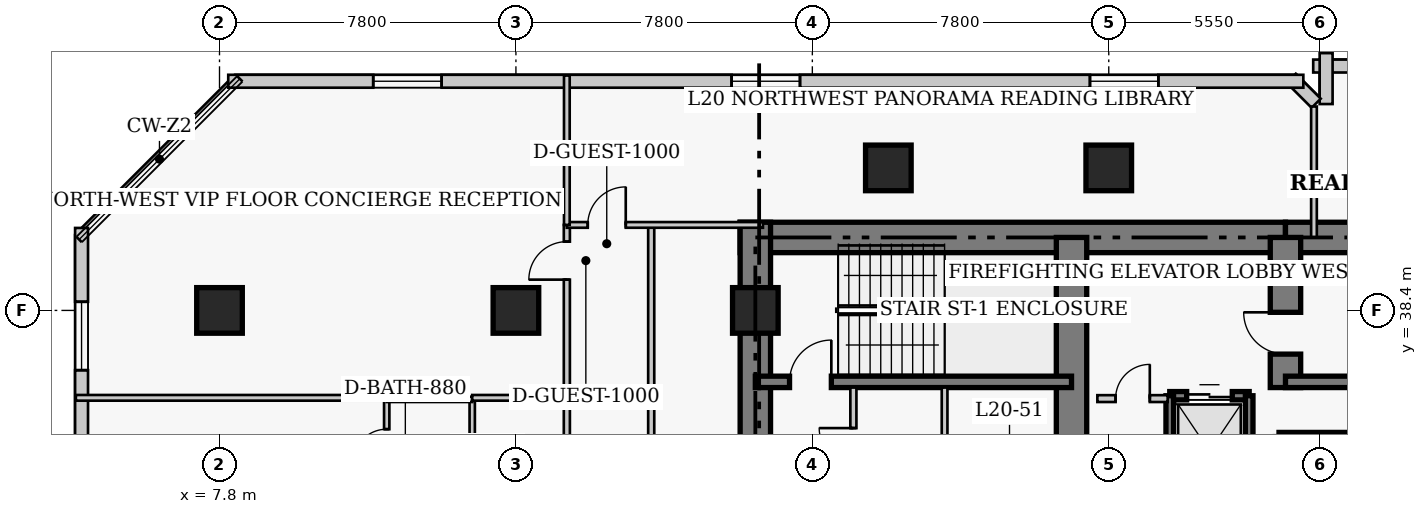
"""IFC4 building model, lengths in metres.
Left out: names, types, materials, properties, quantities, classifications, styles, units other than length and angle.
Written with IfcOpenShell. Run it as: python <this file> out.ifc"""

import sys

from ifc_helpers import new_model, si_unit, direction, frame, frame_2d, origin, origin_2d, place, context, subcontext, project, spatial, rectangle, extrude, element, fill, save


model = new_model("IFC4")
c1 = context("Model", 3, precision=1e-05, world=origin(), true_north=direction((0.0, 1.0)))
c2 = subcontext(c1, "Body", "Model", "MODEL_VIEW")
j1 = project(units=[si_unit("LENGTHUNIT", "METRE"), si_unit("PLANEANGLEUNIT", "RADIAN")], contexts=[c1])
p1 = place(None, origin())
s1 = spatial("IfcSite", under=j1, at=p1, CompositionType="ELEMENT")
p2 = place(p1, origin())
s2 = spatial("IfcBuilding", under=s1, at=p2, CompositionType="ELEMENT")
p3 = place(p2, frame((0.0, 0.0, 84.2)))
s3 = spatial("IfcBuildingStorey", under=s2, at=p3, CompositionType="ELEMENT", Elevation=84.2)
p4 = place(p3, frame((21.5, 40.32, 0.0), z_axis=(0.0, 0.0, 1.0), x_axis=(1.0, 0.0, 0.0)))
e1 = element("IfcWall", 1, at=p4, inside=s3, PredefinedType="SHEAR", context=c2, shape_type="SweptSolid", body=[
    extrude(rectangle(XDim=14.35, YDim=0.8, at=frame_2d((7.175, 0.0))), origin(), (0.0, 0.0, 1.0), 3.8),
])
p5 = place(p3, frame((35.85, 40.32, 0.0), z_axis=(0.0, 0.0, 1.0), x_axis=(1.0, 0.0, 0.0)))
e2 = element("IfcWall", 2, at=p5, inside=s3, PredefinedType="SHEAR", context=c2, shape_type="SweptSolid", body=[
    extrude(rectangle(XDim=12.6, YDim=0.8, at=frame_2d((6.3, 0.0))), origin(), (0.0, 0.0, 1.0), 3.8),
])
p6 = place(p3, frame((21.9, 27.05, 0.0), z_axis=(0.0, 0.0, 1.0), x_axis=(0.0, 1.0, 0.0)))
e3 = element("IfcWall", 3, at=p6, inside=s3, PredefinedType="SHEAR", context=c2, shape_type="SweptSolid", body=[
    extrude(rectangle(XDim=13.67, YDim=0.8, at=frame_2d((6.835, 0.0))), origin(), (0.0, 0.0, 1.0), 3.8),
])
p7 = place(p3, frame((30.22, 33.15, 0.0), z_axis=(0.0, 0.0, 1.0), x_axis=(0.0, 1.0, 0.0)))
e4 = element("IfcWall", 4, at=p7, inside=s3, PredefinedType="SHEAR", context=c2, shape_type="SweptSolid", body=[
    extrude(rectangle(XDim=7.17, YDim=0.8, at=frame_2d((3.585, 0.0))), origin(), (0.0, 0.0, 1.0), 3.8),
])
p8 = place(p3, frame((35.85, 36.37, 0.0), z_axis=(0.0, 0.0, 1.0), x_axis=(0.0, 1.0, 0.0)))
e5 = element("IfcWall", 5, at=p8, inside=s3, PredefinedType="SHEAR", context=c2, shape_type="SweptSolid", body=[
    extrude(rectangle(XDim=3.95, YDim=0.8, at=frame_2d((1.975, 0.0))), origin(), (0.0, 0.0, 1.0), 3.8),
])
p9 = place(p8, frame((0.88, 0.0, 0.0)))
e6 = element("IfcOpeningElement", 6, at=p9, cuts=e5, PredefinedType="OPENING", context=c2, shape_type="SweptSolid", body=[
    extrude(rectangle(XDim=1.1, YDim=2.15, at=frame_2d((0.55, 1.075))), frame((0.0, 0.41, 0.0), z_axis=(0.0, -1.0, 0.0), x_axis=(1.0, 0.0, 0.0)), (0.0, 0.0, 1.0), 0.82),
])
p10 = place(p3, frame((21.9, 36.52, 0.0), z_axis=(0.0, 0.0, 1.0), x_axis=(1.0, 0.0, 0.0)))
e7 = element("IfcWall", 7, at=p10, inside=s3, PredefinedType="SHEAR", context=c2, shape_type="SweptSolid", body=[
    extrude(rectangle(XDim=8.32, YDim=0.3, at=frame_2d((4.16, 0.0))), origin(), (0.0, 0.0, 1.0), 3.8),
])
p11 = place(p10, frame((0.9, 0.0, 0.0)))
e8 = element("IfcOpeningElement", 8, at=p11, cuts=e7, PredefinedType="OPENING", context=c2, shape_type="SweptSolid", body=[
    extrude(rectangle(XDim=1.1, YDim=2.15, at=frame_2d((0.55, 1.075))), frame((0.0, 0.16, 0.0), z_axis=(0.0, -1.0, 0.0), x_axis=(1.0, 0.0, 0.0)), (0.0, 0.0, 1.0), 0.32),
])
p12 = place(p3, frame((35.85, 36.52, 0.0), z_axis=(0.0, 0.0, 1.0), x_axis=(1.0, 0.0, 0.0)))
e9 = element("IfcWall", 9, at=p12, inside=s3, PredefinedType="SHEAR", context=c2, shape_type="SweptSolid", body=[
    extrude(rectangle(XDim=8.33, YDim=0.3, at=frame_2d((4.165, 0.0))), origin(), (0.0, 0.0, 1.0), 3.8),
])
for number, where, z_axis, x_axis in (
    (10, (7.8, 38.4, 0.0), (0.0, 0.0, 1.0), (1.0, 0.0, 0.0)),
    (11, (15.6, 38.4, 0.0), (0.0, 0.0, 1.0), (1.0, 0.0, 0.0)),
    (12, (21.9, 38.4, 0.0), (0.0, 0.0, 1.0), (1.0, 0.0, 0.0)),
    (13, (25.4, 42.15, 0.0), (0.0, 0.0, 1.0), (1.0, 0.0, 0.0)),
    (14, (31.2, 42.15, 0.0), (0.0, 0.0, 1.0), (1.0, 0.0, 0.0)),
):
    element("IfcColumn", number, at=place(p3, frame(where, z_axis=z_axis, x_axis=x_axis)), inside=s3, PredefinedType="COLUMN", context=c2, shape_type="SweptSolid", body=[
        extrude(rectangle(XDim=1.2, YDim=1.2, at=origin_2d()), origin(), (0.0, 0.0, 1.0), 3.8),
    ])
p13 = place(p3, frame((41.42, 44.83, 0.0), z_axis=(0.0, 0.0, 1.0), x_axis=(-1.0, 0.0, 0.0)))
e15 = element("IfcWall", 15, at=p13, inside=s3, PredefinedType="SOLIDWALL", context=c2, shape_type="SweptSolid", body=[
    extrude(rectangle(XDim=4.84, YDim=0.34, at=frame_2d((2.42, 0.0))), origin(), (0.0, 0.0, 1.0), 3.54),
])
p14 = place(p13, frame((1.52, 0.0, 0.85)))
e16 = element("IfcOpeningElement", 16, at=p14, cuts=e15, PredefinedType="OPENING", context=c2, shape_type="SweptSolid", body=[
    extrude(rectangle(XDim=1.8, YDim=1.8, at=frame_2d((0.9, 0.9))), frame((0.0, 0.18, 0.0), z_axis=(0.0, -1.0, 0.0), x_axis=(1.0, 0.0, 0.0)), (0.0, 0.0, 1.0), 0.36),
])
p15 = place(p3, frame((36.92, 45.17, 0.0), z_axis=(0.0, 0.0, 1.0), x_axis=(0.0, -1.0, 0.0)))
e17 = element("IfcWall", 17, at=p15, inside=s3, PredefinedType="SOLIDWALL", context=c2, shape_type="SweptSolid", body=[
    extrude(rectangle(XDim=1.34, YDim=0.34, at=frame_2d((0.67, 0.0))), origin(), (0.0, 0.0, 1.0), 3.54),
])
p16 = place(p3, frame((36.658, 43.852, 0.0), z_axis=(0.0, 0.0, 1.0), x_axis=(-0.707238225886, 0.706975312048, 0.0)))
e18 = element("IfcWall", 18, at=p16, inside=s3, PredefinedType="SOLIDWALL", context=c2, shape_type="SweptSolid", body=[
    extrude(rectangle(XDim=0.929, YDim=0.34, at=frame_2d((0.464, 0.0))), origin(), (0.0, 0.0, 1.0), 3.54),
])
p17 = place(p3, frame((36.32, 44.43, 0.0), z_axis=(0.0, 0.0, 1.0), x_axis=(-1.0, 0.0, 0.0)))
e19 = element("IfcWall", 19, at=p17, inside=s3, PredefinedType="SOLIDWALL", context=c2, shape_type="SweptSolid", body=[
    extrude(rectangle(XDim=28.29, YDim=0.34, at=frame_2d((14.145, 0.0))), origin(), (0.0, 0.0, 1.0), 3.54),
])
p18 = place(p17, frame((3.815, 0.0, 0.85)))
e20 = element("IfcOpeningElement", 20, at=p18, cuts=e19, PredefinedType="OPENING", context=c2, shape_type="SweptSolid", body=[
    extrude(rectangle(XDim=1.8, YDim=1.8, at=frame_2d((0.9, 0.9))), frame((0.0, 0.18, 0.0), z_axis=(0.0, -1.0, 0.0), x_axis=(1.0, 0.0, 0.0)), (0.0, 0.0, 1.0), 0.36),
])
p19 = place(p17, frame((13.245, 0.0, 0.85)))
e21 = element("IfcOpeningElement", 21, at=p19, cuts=e19, PredefinedType="OPENING", context=c2, shape_type="SweptSolid", body=[
    extrude(rectangle(XDim=1.8, YDim=1.8, at=frame_2d((0.9, 0.9))), frame((0.0, 0.18, 0.0), z_axis=(0.0, -1.0, 0.0), x_axis=(1.0, 0.0, 0.0)), (0.0, 0.0, 1.0), 0.36),
])
p20 = place(p17, frame((22.675, 0.0, 0.85)))
e22 = element("IfcOpeningElement", 22, at=p20, cuts=e19, PredefinedType="OPENING", context=c2, shape_type="SweptSolid", body=[
    extrude(rectangle(XDim=1.8, YDim=1.8, at=frame_2d((0.9, 0.9))), frame((0.0, 0.18, 0.0), z_axis=(0.0, -1.0, 0.0), x_axis=(1.0, 0.0, 0.0)), (0.0, 0.0, 1.0), 0.36),
])
p21 = place(p3, frame((4.17, 40.57, 0.0), z_axis=(0.0, 0.0, 1.0), x_axis=(0.0, -1.0, 0.0)))
e23 = element("IfcWall", 23, at=p21, inside=s3, PredefinedType="SOLIDWALL", context=c2, shape_type="SweptSolid", body=[
    extrude(rectangle(XDim=31.94, YDim=0.34, at=frame_2d((15.97, 0.0))), origin(), (0.0, 0.0, 1.0), 3.54),
])
p22 = place(p21, frame((1.942, 0.0, 0.85)))
e24 = element("IfcOpeningElement", 24, at=p22, cuts=e23, PredefinedType="OPENING", context=c2, shape_type="SweptSolid", body=[
    extrude(rectangle(XDim=1.8, YDim=1.8, at=frame_2d((0.9, 0.9))), frame((0.0, 0.18, 0.0), z_axis=(0.0, -1.0, 0.0), x_axis=(1.0, 0.0, 0.0)), (0.0, 0.0, 1.0), 0.36),
])
p23 = place(p21, frame((12.228, 0.0, 0.85)))
e25 = element("IfcOpeningElement", 25, at=p23, cuts=e23, PredefinedType="OPENING", context=c2, shape_type="SweptSolid", body=[
    extrude(rectangle(XDim=1.8, YDim=1.8, at=frame_2d((0.9, 0.9))), frame((0.0, 0.18, 0.0), z_axis=(0.0, -1.0, 0.0), x_axis=(1.0, 0.0, 0.0)), (0.0, 0.0, 1.0), 0.36),
])
p24 = place(p21, frame((18.413, 0.0, 0.85)))
e26 = element("IfcOpeningElement", 26, at=p24, cuts=e23, PredefinedType="OPENING", context=c2, shape_type="SweptSolid", body=[
    extrude(rectangle(XDim=1.8, YDim=1.8, at=frame_2d((0.9, 0.9))), frame((0.0, 0.18, 0.0), z_axis=(0.0, -1.0, 0.0), x_axis=(1.0, 0.0, 0.0)), (0.0, 0.0, 1.0), 0.36),
])
p25 = place(p21, frame((27.048, 0.0, 0.85)))
e27 = element("IfcOpeningElement", 27, at=p25, cuts=e23, PredefinedType="OPENING", context=c2, shape_type="SweptSolid", body=[
    extrude(rectangle(XDim=1.8, YDim=1.8, at=frame_2d((0.9, 0.9))), frame((0.0, 0.18, 0.0), z_axis=(0.0, -1.0, 0.0), x_axis=(1.0, 0.0, 0.0)), (0.0, 0.0, 1.0), 0.36),
])
p26 = place(p21, frame((7.46, 0.0, 0.85)))
e28 = element("IfcOpeningElement", 28, at=p26, cuts=e23, PredefinedType="OPENING", context=c2, shape_type="SweptSolid", body=[
    extrude(rectangle(XDim=1.3, YDim=1.7, at=frame_2d((0.65, 0.85))), frame((0.0, 0.18, 0.0), z_axis=(0.0, -1.0, 0.0), x_axis=(1.0, 0.0, 0.0)), (0.0, 0.0, 1.0), 0.36),
])
p27 = place(p3, frame((35.68, 35.08, 0.0), z_axis=(0.0, 0.0, 1.0), x_axis=(1.0, 0.0, 0.0)))
e29 = element("IfcWall", 29, at=p27, inside=s3, PredefinedType="SHEAR", context=c2, shape_type="SweptSolid", body=[
    extrude(rectangle(XDim=2.32, YDim=0.22, at=frame_2d((1.16, 0.0))), origin(), (0.0, 0.0, 1.0), 3.8),
])
p28 = place(p3, frame((32.805, 36.155, 0.0), z_axis=(0.0, 0.0, 1.0), x_axis=(1.0, 0.0, 0.0)))
e30 = element("IfcWall", 30, at=p28, inside=s3, PredefinedType="SHEAR", context=c2, shape_type="SweptSolid", body=[
    extrude(rectangle(XDim=2.09, YDim=0.22, at=frame_2d((1.045, 0.0))), origin(), (0.0, 0.0, 1.0), 3.8),
])
p29 = place(p28, frame((0.445, 0.0, 0.0)))
e31 = element("IfcOpeningElement", 31, at=p29, cuts=e30, PredefinedType="OPENING", context=c2, shape_type="SweptSolid", body=[
    extrude(rectangle(XDim=1.2, YDim=2.15, at=frame_2d((0.6, 1.075))), frame((0.0, 0.12, 0.0), z_axis=(0.0, -1.0, 0.0), x_axis=(1.0, 0.0, 0.0)), (0.0, 0.0, 1.0), 0.24),
])
for number, where, z_axis, x_axis in (
    (32, (32.805, 33.245, 0.0), (0.0, 0.0, 1.0), (0.0, 1.0, 0.0)),
    (33, (34.895, 33.245, 0.0), (0.0, 0.0, 1.0), (0.0, 1.0, 0.0)),
):
    element("IfcWall", number, at=place(p3, frame(where, z_axis=z_axis, x_axis=x_axis)), inside=s3, PredefinedType="SHEAR", context=c2, shape_type="SweptSolid", body=[
        extrude(rectangle(XDim=2.91, YDim=0.2, at=frame_2d((1.455, 0.0))), origin(), (0.0, 0.0, 1.0), 3.8),
    ])
p30 = place(p3, frame((30.9, 36.08, 0.0), z_axis=(0.0, 0.0, 1.0), x_axis=(1.0, 0.0, 0.0)))
e34 = element("IfcWall", 34, at=p30, inside=s3, PredefinedType="PARTITIONING", context=c2, shape_type="SweptSolid", body=[
    extrude(rectangle(XDim=1.85, YDim=0.18, at=frame_2d((0.925, 0.0))), origin(), (0.0, 0.0, 1.0), 3.54),
])
p31 = place(p30, frame((0.48, 0.0, 0.0)))
e35 = element("IfcOpeningElement", 35, at=p31, cuts=e34, PredefinedType="OPENING", context=c2, shape_type="SweptSolid", body=[
    extrude(rectangle(XDim=0.9, YDim=2.15, at=frame_2d((0.45, 1.075))), frame((0.0, 0.1, 0.0), z_axis=(0.0, -1.0, 0.0), x_axis=(1.0, 0.0, 0.0)), (0.0, 0.0, 1.0), 0.2),
])
p32 = place(p3, frame((24.48, 32.8, 0.0), z_axis=(0.0, 0.0, 1.0), x_axis=(0.0, 1.0, 0.0)))
e36 = element("IfcWall", 36, at=p32, inside=s3, PredefinedType="PARTITIONING", context=c2, shape_type="SweptSolid", body=[
    extrude(rectangle(XDim=3.57, YDim=0.16, at=frame_2d((1.785, 0.0))), origin(), (0.0, 0.0, 1.0), 3.54),
])
p33 = place(p32, frame((1.604, 0.0, 0.0)))
e37 = element("IfcOpeningElement", 37, at=p33, cuts=e36, PredefinedType="OPENING", context=c2, shape_type="SweptSolid", body=[
    extrude(rectangle(XDim=0.9, YDim=2.1, at=frame_2d((0.45, 1.05))), frame((0.0, 0.09, 0.0), z_axis=(0.0, -1.0, 0.0), x_axis=(1.0, 0.0, 0.0)), (0.0, 0.0, 1.0), 0.18),
])
p34 = place(p3, frame((26.88, 32.75, 0.0), z_axis=(0.0, 0.0, 1.0), x_axis=(0.0, 1.0, 0.0)))
e38 = element("IfcWall", 38, at=p34, inside=s3, PredefinedType="PARTITIONING", context=c2, shape_type="SweptSolid", body=[
    extrude(rectangle(XDim=3.62, YDim=0.15, at=frame_2d((1.81, 0.0))), origin(), (0.0, 0.0, 1.0), 3.54),
])
p35 = place(p3, frame((16.94, 6.65, 0.0), z_axis=(0.0, 0.0, 1.0), x_axis=(0.0, 1.0, 0.0)))
e39 = element("IfcWall", 39, at=p35, inside=s3, PredefinedType="PARTITIONING", context=c2, shape_type="SweptSolid", body=[
    extrude(rectangle(XDim=34.0, YDim=0.16, at=frame_2d((17.0, 0.0))), origin(), (0.0, 0.0, 1.0), 3.54),
])
p36 = place(p35, frame((1.8, 0.0, 0.0)))
e40 = element("IfcOpeningElement", 40, at=p36, cuts=e39, PredefinedType="OPENING", context=c2, shape_type="SweptSolid", body=[
    extrude(rectangle(XDim=0.95, YDim=2.1, at=frame_2d((0.475, 1.05))), frame((0.0, 0.09, 0.0), z_axis=(0.0, -1.0, 0.0), x_axis=(1.0, 0.0, 0.0)), (0.0, 0.0, 1.0), 0.18),
])
p37 = place(p35, frame((8.475, 0.0, 0.0)))
e41 = element("IfcOpeningElement", 41, at=p37, cuts=e39, PredefinedType="OPENING", context=c2, shape_type="SweptSolid", body=[
    extrude(rectangle(XDim=0.95, YDim=2.1, at=frame_2d((0.475, 1.05))), frame((0.0, 0.09, 0.0), z_axis=(0.0, -1.0, 0.0), x_axis=(1.0, 0.0, 0.0)), (0.0, 0.0, 1.0), 0.18),
])
p38 = place(p35, frame((17.275, 0.0, 0.0)))
e42 = element("IfcOpeningElement", 42, at=p38, cuts=e39, PredefinedType="OPENING", context=c2, shape_type="SweptSolid", body=[
    extrude(rectangle(XDim=0.95, YDim=2.1, at=frame_2d((0.475, 1.05))), frame((0.0, 0.09, 0.0), z_axis=(0.0, -1.0, 0.0), x_axis=(1.0, 0.0, 0.0)), (0.0, 0.0, 1.0), 0.18),
])
p39 = place(p35, frame((25.325, 0.0, 0.0)))
e43 = element("IfcOpeningElement", 43, at=p39, cuts=e39, PredefinedType="OPENING", context=c2, shape_type="SweptSolid", body=[
    extrude(rectangle(XDim=0.95, YDim=2.1, at=frame_2d((0.475, 1.05))), frame((0.0, 0.09, 0.0), z_axis=(0.0, -1.0, 0.0), x_axis=(1.0, 0.0, 0.0)), (0.0, 0.0, 1.0), 0.18),
])
p40 = place(p35, frame((32.56, 0.0, 0.0)))
e44 = element("IfcOpeningElement", 44, at=p40, cuts=e39, PredefinedType="OPENING", context=c2, shape_type="SweptSolid", body=[
    extrude(rectangle(XDim=1.0, YDim=2.15, at=frame_2d((0.5, 1.075))), frame((0.0, 0.09, 0.0), z_axis=(0.0, -1.0, 0.0), x_axis=(1.0, 0.0, 0.0)), (0.0, 0.0, 1.0), 0.18),
])
p41 = place(p3, frame((19.16, 35.02, 0.0), z_axis=(0.0, 0.0, 1.0), x_axis=(0.0, 1.0, 0.0)))
e45 = element("IfcWall", 45, at=p41, inside=s3, PredefinedType="PARTITIONING", context=c2, shape_type="SweptSolid", body=[
    extrude(rectangle(XDim=5.63, YDim=0.16, at=frame_2d((2.815, 0.0))), origin(), (0.0, 0.0, 1.0), 3.54),
])
p42 = place(p3, frame((16.94, 40.65, 0.0), z_axis=(0.0, 0.0, 1.0), x_axis=(1.0, 0.0, 0.0)))
e46 = element("IfcWall", 46, at=p42, inside=s3, PredefinedType="PARTITIONING", context=c2, shape_type="SweptSolid", body=[
    extrude(rectangle(XDim=5.16, YDim=0.15, at=frame_2d((2.58, 0.0))), origin(), (0.0, 0.0, 1.0), 3.54),
])
p43 = place(p42, frame((0.55, 0.0, 0.0)))
e47 = element("IfcOpeningElement", 47, at=p43, cuts=e46, PredefinedType="OPENING", context=c2, shape_type="SweptSolid", body=[
    extrude(rectangle(XDim=1.0, YDim=2.15, at=frame_2d((0.5, 1.075))), frame((0.0, 0.085, 0.0), z_axis=(0.0, -1.0, 0.0), x_axis=(1.0, 0.0, 0.0)), (0.0, 0.0, 1.0), 0.17),
])
p44 = place(p3, frame((16.94, 40.65, 0.0), z_axis=(0.0, 0.0, 1.0), x_axis=(0.0, 1.0, 0.0)))
e48 = element("IfcWall", 48, at=p44, inside=s3, PredefinedType="PARTITIONING", context=c2, shape_type="SweptSolid", body=[
    extrude(rectangle(XDim=3.93, YDim=0.15, at=frame_2d((1.965, 0.0))), origin(), (0.0, 0.0, 1.0), 3.54),
])
p45 = place(p3, frame((36.6, 40.32, 0.0), z_axis=(0.0, 0.0, 1.0), x_axis=(0.0, 1.0, 0.0)))
e49 = element("IfcWall", 49, at=p45, inside=s3, PredefinedType="PARTITIONING", context=c2, shape_type="SweptSolid", body=[
    extrude(rectangle(XDim=3.445, YDim=0.15, at=frame_2d((1.723, 0.0))), origin(), (0.0, 0.0, 1.0), 3.54),
])
p46 = place(p3, frame((12.2, 33.61, 0.0), z_axis=(0.0, 0.0, 1.0), x_axis=(0.0, 1.0, 0.0)))
e50 = element("IfcWall", 50, at=p46, inside=s3, PredefinedType="PLUMBINGWALL", context=c2, shape_type="SweptSolid", body=[
    extrude(rectangle(XDim=2.45, YDim=0.14, at=frame_2d((1.225, 0.0))), origin(), (0.0, 0.0, 1.0), 3.54),
])
p47 = place(p46, frame((0.785, 0.0, 0.0)))
e51 = element("IfcOpeningElement", 51, at=p47, cuts=e50, PredefinedType="OPENING", context=c2, shape_type="SweptSolid", body=[
    extrude(rectangle(XDim=0.88, YDim=2.05, at=frame_2d((0.44, 1.025))), frame((0.0, 0.08, 0.0), z_axis=(0.0, -1.0, 0.0), x_axis=(1.0, 0.0, 0.0)), (0.0, 0.0, 1.0), 0.16),
])
p48 = place(p3, frame((14.45, 33.61, 0.0), z_axis=(0.0, 0.0, 1.0), x_axis=(0.0, 1.0, 0.0)))
e52 = element("IfcWall", 52, at=p48, inside=s3, PredefinedType="PLUMBINGWALL", context=c2, shape_type="SweptSolid", body=[
    extrude(rectangle(XDim=2.45, YDim=0.14, at=frame_2d((1.225, 0.0))), origin(), (0.0, 0.0, 1.0), 3.54),
])
p49 = place(p3, frame((12.2, 36.06, 0.0), z_axis=(0.0, 0.0, 1.0), x_axis=(1.0, 0.0, 0.0)))
e53 = element("IfcWall", 53, at=p49, inside=s3, PredefinedType="PLUMBINGWALL", context=c2, shape_type="SweptSolid", body=[
    extrude(rectangle(XDim=2.25, YDim=0.14, at=frame_2d((1.125, 0.0))), origin(), (0.0, 0.0, 1.0), 3.54),
])
p50 = place(p3, frame((4.02, 36.1, 0.0), z_axis=(0.0, 0.0, 1.0), x_axis=(1.0, 0.0, 0.0)))
e54 = element("IfcWall", 54, at=p50, inside=s3, PredefinedType="PARTITIONING", context=c2, shape_type="SweptSolid", body=[
    extrude(rectangle(XDim=8.18, YDim=0.15, at=frame_2d((4.09, 0.0))), origin(), (0.0, 0.0, 1.0), 3.54),
])
p51 = place(p3, frame((14.45, 36.1, 0.0), z_axis=(0.0, 0.0, 1.0), x_axis=(1.0, 0.0, 0.0)))
e55 = element("IfcWall", 55, at=p51, inside=s3, PredefinedType="PARTITIONING", context=c2, shape_type="SweptSolid", body=[
    extrude(rectangle(XDim=2.49, YDim=0.15, at=frame_2d((1.245, 0.0))), origin(), (0.0, 0.0, 1.0), 3.54),
])
p52 = place(p18, origin())
e56 = element("IfcWindow", 56, at=p52, inside=s3, PartitioningType="SINGLE_PANEL", PredefinedType="WINDOW", context=c2, shape_type="SweptSolid", body=[
    extrude(rectangle(XDim=1.8, YDim=1.8, at=frame_2d((0.9, 0.9))), frame((0.0, 0.03, 0.0), z_axis=(0.0, -1.0, 0.0), x_axis=(1.0, 0.0, 0.0)), (0.0, 0.0, 1.0), 0.06),
])
fill(e20, e56)
p53 = place(p19, origin())
e57 = element("IfcWindow", 57, at=p53, inside=s3, PartitioningType="SINGLE_PANEL", PredefinedType="WINDOW", context=c2, shape_type="SweptSolid", body=[
    extrude(rectangle(XDim=1.8, YDim=1.8, at=frame_2d((0.9, 0.9))), frame((0.0, 0.03, 0.0), z_axis=(0.0, -1.0, 0.0), x_axis=(1.0, 0.0, 0.0)), (0.0, 0.0, 1.0), 0.06),
])
fill(e21, e57)
p54 = place(p20, origin())
e58 = element("IfcWindow", 58, at=p54, inside=s3, PartitioningType="SINGLE_PANEL", PredefinedType="WINDOW", context=c2, shape_type="SweptSolid", body=[
    extrude(rectangle(XDim=1.8, YDim=1.8, at=frame_2d((0.9, 0.9))), frame((0.0, 0.03, 0.0), z_axis=(0.0, -1.0, 0.0), x_axis=(1.0, 0.0, 0.0)), (0.0, 0.0, 1.0), 0.06),
])
fill(e22, e58)
p55 = place(p22, origin())
e59 = element("IfcWindow", 59, at=p55, inside=s3, PartitioningType="SINGLE_PANEL", PredefinedType="WINDOW", context=c2, shape_type="SweptSolid", body=[
    extrude(rectangle(XDim=1.8, YDim=1.8, at=frame_2d((0.9, 0.9))), frame((0.0, 0.03, 0.0), z_axis=(0.0, -1.0, 0.0), x_axis=(1.0, 0.0, 0.0)), (0.0, 0.0, 1.0), 0.06),
])
fill(e24, e59)
p56 = place(p29, origin())
e60 = element("IfcDoor", 60, at=p56, inside=s3, OperationType="DOUBLE_DOOR_SLIDING", PredefinedType="DOOR", context=c2, shape_type="SweptSolid", body=[
    extrude(rectangle(XDim=1.2, YDim=2.15, at=frame_2d((0.6, 1.075))), frame((0.0, 0.025, 0.0), z_axis=(0.0, -1.0, 0.0), x_axis=(1.0, 0.0, 0.0)), (0.0, 0.0, 1.0), 0.05),
])
fill(e31, e60)
p57 = place(p31, origin())
e61 = element("IfcDoor", 61, at=p57, inside=s3, OperationType="SINGLE_SWING_RIGHT", PredefinedType="DOOR", context=c2, shape_type="SweptSolid", body=[
    extrude(rectangle(XDim=0.9, YDim=2.15, at=frame_2d((0.45, 1.075))), frame((0.0, 0.025, 0.0), z_axis=(0.0, -1.0, 0.0), x_axis=(1.0, 0.0, 0.0)), (0.0, 0.0, 1.0), 0.05),
])
fill(e35, e61)
p58 = place(p33, origin())
e62 = element("IfcDoor", 62, at=p58, inside=s3, OperationType="SINGLE_SWING_RIGHT", PredefinedType="DOOR", context=c2, shape_type="SweptSolid", body=[
    extrude(rectangle(XDim=0.9, YDim=2.1, at=frame_2d((0.45, 1.05))), frame((0.0, 0.025, 0.0), z_axis=(0.0, -1.0, 0.0), x_axis=(1.0, 0.0, 0.0)), (0.0, 0.0, 1.0), 0.05),
])
fill(e37, e62)
p59 = place(p43, origin())
e63 = element("IfcDoor", 63, at=p59, inside=s3, OperationType="SINGLE_SWING_RIGHT", PredefinedType="DOOR", context=c2, shape_type="SweptSolid", body=[
    extrude(rectangle(XDim=1.0, YDim=2.15, at=frame_2d((0.5, 1.075))), frame((0.0, 0.025, 0.0), z_axis=(0.0, -1.0, 0.0), x_axis=(1.0, 0.0, 0.0)), (0.0, 0.0, 1.0), 0.05),
])
fill(e47, e63)
p60 = place(p47, origin())
e64 = element("IfcDoor", 64, at=p60, inside=s3, OperationType="SINGLE_SWING_LEFT", PredefinedType="DOOR", context=c2, shape_type="SweptSolid", body=[
    extrude(rectangle(XDim=0.88, YDim=2.05, at=frame_2d((0.44, 1.025))), frame((0.0, 0.025, 0.0), z_axis=(0.0, -1.0, 0.0), x_axis=(1.0, 0.0, 0.0)), (0.0, 0.0, 1.0), 0.05),
])
fill(e51, e64)
p61 = place(p40, origin())
e65 = element("IfcDoor", 65, at=p61, inside=s3, OperationType="SINGLE_SWING_LEFT", PredefinedType="DOOR", context=c2, shape_type="SweptSolid", body=[
    extrude(rectangle(XDim=1.0, YDim=2.15, at=frame_2d((0.5, 1.075))), frame((0.0, 0.025, 0.0), z_axis=(0.0, -1.0, 0.0), x_axis=(1.0, 0.0, 0.0)), (0.0, 0.0, 1.0), 0.05),
])
fill(e44, e65)
p62 = place(p11, origin())
e66 = element("IfcDoor", 66, at=p62, inside=s3, OperationType="SINGLE_SWING_RIGHT", PredefinedType="DOOR", context=c2, shape_type="SweptSolid", body=[
    extrude(rectangle(XDim=1.1, YDim=2.15, at=frame_2d((0.55, 1.075))), frame((0.0, 0.025, 0.0), z_axis=(0.0, -1.0, 0.0), x_axis=(1.0, 0.0, 0.0)), (0.0, 0.0, 1.0), 0.05),
])
fill(e8, e66)
p63 = place(p9, origin())
e67 = element("IfcDoor", 67, at=p63, inside=s3, OperationType="SINGLE_SWING_RIGHT", PredefinedType="DOOR", context=c2, shape_type="SweptSolid", body=[
    extrude(rectangle(XDim=1.1, YDim=2.15, at=frame_2d((0.55, 1.075))), frame((0.0, 0.025, 0.0), z_axis=(0.0, -1.0, 0.0), x_axis=(1.0, 0.0, 0.0)), (0.0, 0.0, 1.0), 0.05),
])
fill(e6, e67)
save(model, sys.argv[1])
